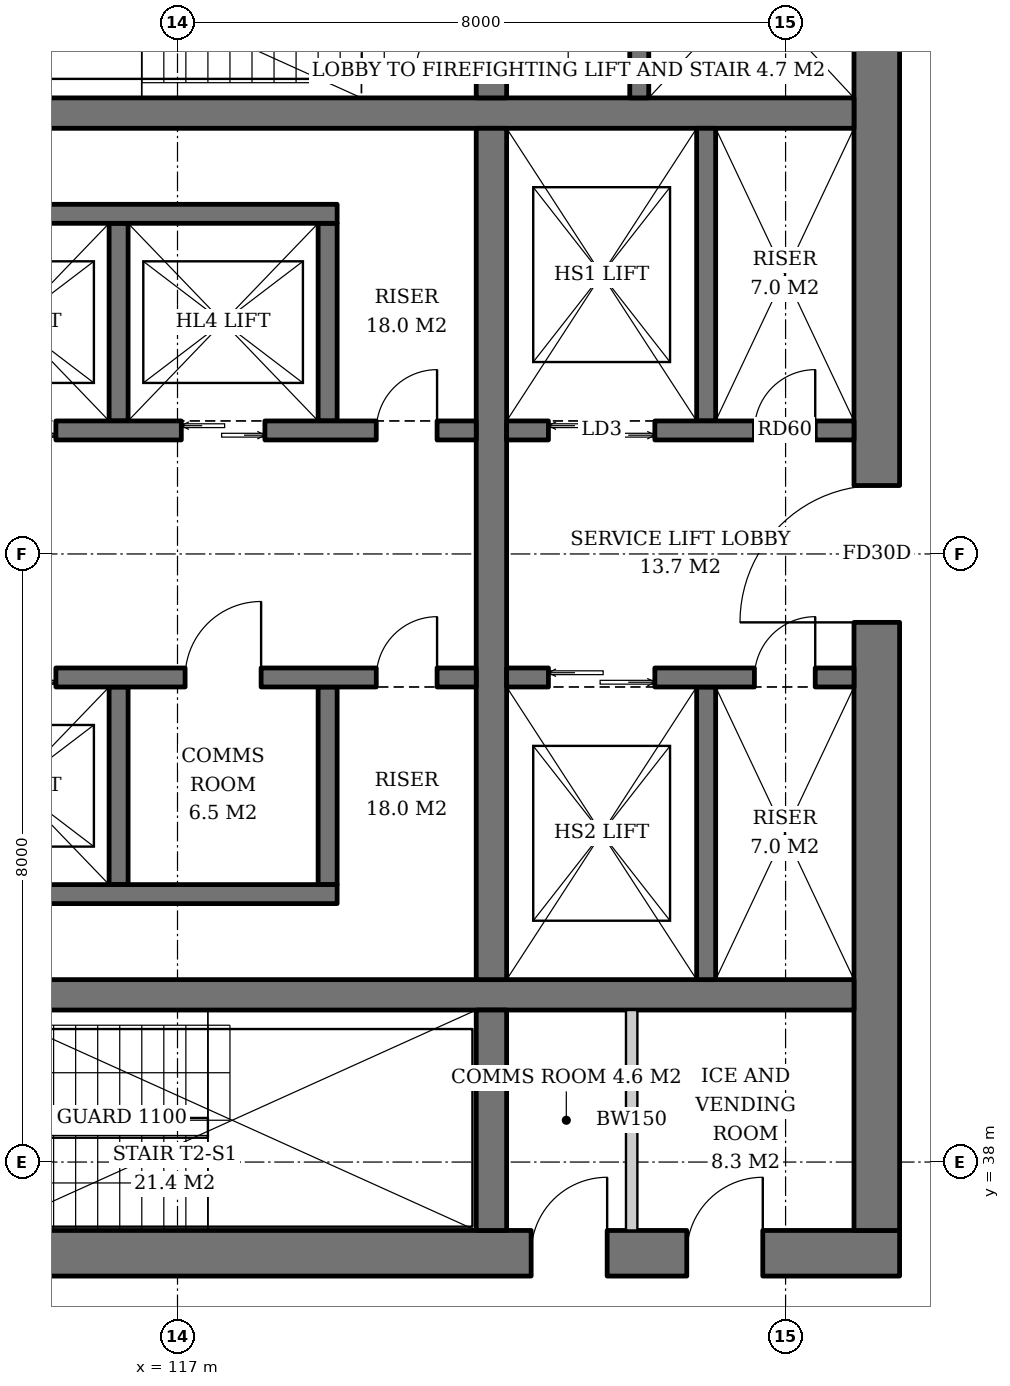
"""IFC4 building model, lengths in metres.
Left out: names, types, materials, properties, quantities, classifications, styles, units other than length and angle.
Written with IfcOpenShell. Run it as: python <this file> out.ifc"""

import sys

from ifc_helpers import new_model, si_unit, direction, frame, frame_2d, origin, place, context, subcontext, project, spatial, rectangle, extrude, element, fill, save


model = new_model("IFC4")
c1 = context("Model", 3, precision=1e-05, world=origin(), true_north=direction((0.0, 1.0)))
c2 = subcontext(c1, "Body", "Model", "MODEL_VIEW")
j1 = project(units=[si_unit("LENGTHUNIT", "METRE"), si_unit("PLANEANGLEUNIT", "RADIAN")], contexts=[c1])
p1 = place(None, origin())
s1 = spatial("IfcSite", under=j1, at=p1, CompositionType="ELEMENT")
p2 = place(p1, origin())
s2 = spatial("IfcBuilding", under=s1, at=p2, CompositionType="ELEMENT")
p3 = place(p2, frame((0.0, 0.0, 97.0)))
s3 = spatial("IfcBuildingStorey", under=s2, at=p3, CompositionType="ELEMENT", Elevation=97.0)
p4 = place(p3, frame((107.5, 36.8, 0.0), z_axis=(0.0, 0.0, 1.0), x_axis=(1.0, 0.0, 0.0)))
e1 = element("IfcWall", 1, at=p4, inside=s3, PredefinedType="SHEAR", context=c2, shape_type="SweptSolid", body=[
    extrude(rectangle(XDim=19.0, YDim=0.6, at=frame_2d((9.5, 0.0))), origin(), (0.0, 0.0, 1.0), 3.8),
])
p5 = place(p4, frame((3.9, 0.0, 0.0)))
e2 = element("IfcOpeningElement", 2, at=p5, cuts=e1, PredefinedType="OPENING", context=c2, shape_type="SweptSolid", body=[
    extrude(rectangle(XDim=1.0, YDim=2.1, at=frame_2d((0.5, 1.05))), frame((0.0, 0.31, 0.0), z_axis=(0.0, -1.0, 0.0), x_axis=(1.0, 0.0, 0.0)), (0.0, 0.0, 1.0), 0.62),
])
p6 = place(p4, frame((14.153, 0.0, 0.0)))
e3 = element("IfcOpeningElement", 3, at=p6, cuts=e1, PredefinedType="OPENING", context=c2, shape_type="SweptSolid", body=[
    extrude(rectangle(XDim=1.0, YDim=2.1, at=frame_2d((0.5, 1.05))), frame((0.0, 0.31, 0.0), z_axis=(0.0, -1.0, 0.0), x_axis=(1.0, 0.0, 0.0)), (0.0, 0.0, 1.0), 0.62),
])
p7 = place(p4, frame((16.2, 0.0, 0.0)))
e4 = element("IfcOpeningElement", 4, at=p7, cuts=e1, PredefinedType="OPENING", context=c2, shape_type="SweptSolid", body=[
    extrude(rectangle(XDim=1.0, YDim=2.1, at=frame_2d((0.5, 1.05))), frame((0.0, 0.31, 0.0), z_axis=(0.0, -1.0, 0.0), x_axis=(1.0, 0.0, 0.0)), (0.0, 0.0, 1.0), 0.62),
])
p8 = place(p3, frame((126.2, 37.1, 0.0), z_axis=(0.0, 0.0, 1.0), x_axis=(0.0, 1.0, 0.0)))
e5 = element("IfcWall", 5, at=p8, inside=s3, PredefinedType="SHEAR", context=c2, shape_type="SweptSolid", body=[
    extrude(rectangle(XDim=17.8, YDim=0.6, at=frame_2d((8.9, 0.0))), origin(), (0.0, 0.0, 1.0), 3.8),
])
p9 = place(p8, frame((8.0, 0.0, 0.0)))
e6 = element("IfcOpeningElement", 6, at=p9, cuts=e5, PredefinedType="OPENING", context=c2, shape_type="SweptSolid", body=[
    extrude(rectangle(XDim=1.8, YDim=2.4, at=frame_2d((0.9, 1.2))), frame((0.0, 0.31, 0.0), z_axis=(0.0, -1.0, 0.0), x_axis=(1.0, 0.0, 0.0)), (0.0, 0.0, 1.0), 0.62),
])
for number, where, z_axis, x_axis in (
    (7, (108.1, 40.2, 0.0), (0.0, 0.0, 1.0), (1.0, 0.0, 0.0)),
    (8, (108.1, 51.8, 0.0), (0.0, 0.0, 1.0), (1.0, 0.0, 0.0)),
):
    element("IfcWall", number, at=place(p3, frame(where, z_axis=z_axis, x_axis=x_axis)), inside=s3, PredefinedType="SHEAR", context=c2, shape_type="SweptSolid", body=[
        extrude(rectangle(XDim=17.8, YDim=0.4, at=frame_2d((8.9, 0.0))), origin(), (0.0, 0.0, 1.0), 3.8),
    ])
p10 = place(p3, frame((121.13, 37.1, 0.0), z_axis=(0.0, 0.0, 1.0), x_axis=(0.0, 1.0, 0.0)))
e9 = element("IfcWall", 9, at=p10, inside=s3, PredefinedType="SHEAR", context=c2, shape_type="SweptSolid", body=[
    extrude(rectangle(XDim=2.9, YDim=0.4, at=frame_2d((1.45, 0.0))), origin(), (0.0, 0.0, 1.0), 3.8),
])
p11 = place(p3, frame((121.13, 40.4, 0.0), z_axis=(0.0, 0.0, 1.0), x_axis=(0.0, 1.0, 0.0)))
e10 = element("IfcWall", 10, at=p11, inside=s3, PredefinedType="SHEAR", context=c2, shape_type="SweptSolid", body=[
    extrude(rectangle(XDim=11.2, YDim=0.4, at=frame_2d((5.6, 0.0))), origin(), (0.0, 0.0, 1.0), 3.8),
])
p12 = place(p3, frame((121.13, 52.0, 0.0), z_axis=(0.0, 0.0, 1.0), x_axis=(0.0, 1.0, 0.0)))
e11 = element("IfcWall", 11, at=p12, inside=s3, PredefinedType="SHEAR", context=c2, shape_type="SweptSolid", body=[
    extrude(rectangle(XDim=2.9, YDim=0.4, at=frame_2d((1.45, 0.0))), origin(), (0.0, 0.0, 1.0), 3.8),
])
p13 = place(p12, frame((0.3, 0.0, 0.0)))
e12 = element("IfcOpeningElement", 12, at=p13, cuts=e11, PredefinedType="OPENING", context=c2, shape_type="SweptSolid", body=[
    extrude(rectangle(XDim=1.0, YDim=2.1, at=frame_2d((0.5, 1.05))), frame((0.0, 0.21, 0.0), z_axis=(0.0, -1.0, 0.0), x_axis=(1.0, 0.0, 0.0)), (0.0, 0.0, 1.0), 0.42),
])
p14 = place(p3, frame((123.075, 52.0, 0.0), z_axis=(0.0, 0.0, 1.0), x_axis=(0.0, 1.0, 0.0)))
e13 = element("IfcWall", 13, at=p14, inside=s3, PredefinedType="SHEAR", context=c2, shape_type="SweptSolid", body=[
    extrude(rectangle(XDim=2.9, YDim=0.25, at=frame_2d((1.45, 0.0))), origin(), (0.0, 0.0, 1.0), 3.8),
])
p15 = place(p14, frame((0.8, 0.0, 0.0)))
e14 = element("IfcOpeningElement", 14, at=p15, cuts=e13, PredefinedType="OPENING", context=c2, shape_type="SweptSolid", body=[
    extrude(rectangle(XDim=1.3, YDim=2.2, at=frame_2d((0.65, 1.1))), frame((0.0, 0.135, 0.0), z_axis=(0.0, -1.0, 0.0), x_axis=(1.0, 0.0, 0.0)), (0.0, 0.0, 1.0), 0.27),
])
for number, where, z_axis, x_axis in (
    (15, (116.225, 47.75, 0.0), (0.0, 0.0, 1.0), (0.0, 1.0, 0.0)),
    (16, (118.975, 47.75, 0.0), (0.0, 0.0, 1.0), (0.0, 1.0, 0.0)),
):
    element("IfcWall", number, at=place(p3, frame(where, z_axis=z_axis, x_axis=x_axis)), inside=s3, PredefinedType="SHEAR", context=c2, shape_type="SweptSolid", body=[
        extrude(rectangle(XDim=2.6, YDim=0.25, at=frame_2d((1.3, 0.0))), origin(), (0.0, 0.0, 1.0), 3.8),
    ])
p16 = place(p3, frame((108.1, 50.475, 0.0), z_axis=(0.0, 0.0, 1.0), x_axis=(1.0, 0.0, 0.0)))
e17 = element("IfcWall", 17, at=p16, inside=s3, PredefinedType="SHEAR", context=c2, shape_type="SweptSolid", body=[
    extrude(rectangle(XDim=11.0, YDim=0.25, at=frame_2d((5.5, 0.0))), origin(), (0.0, 0.0, 1.0), 3.8),
])
p17 = place(p3, frame((108.1, 47.625, 0.0), z_axis=(0.0, 0.0, 1.0), x_axis=(1.0, 0.0, 0.0)))
e18 = element("IfcWall", 18, at=p17, inside=s3, PredefinedType="SHEAR", context=c2, shape_type="SweptSolid", body=[
    extrude(rectangle(XDim=12.83, YDim=0.25, at=frame_2d((6.415, 0.0))), origin(), (0.0, 0.0, 1.0), 3.8),
])
p18 = place(p17, frame((0.7, 0.0, 0.0)))
e19 = element("IfcOpeningElement", 19, at=p18, cuts=e18, PredefinedType="OPENING", context=c2, shape_type="SweptSolid", body=[
    extrude(rectangle(XDim=1.1, YDim=2.2, at=frame_2d((0.55, 1.1))), frame((0.0, 0.135, 0.0), z_axis=(0.0, -1.0, 0.0), x_axis=(1.0, 0.0, 0.0)), (0.0, 0.0, 1.0), 0.27),
])
p19 = place(p17, frame((3.45, 0.0, 0.0)))
e20 = element("IfcOpeningElement", 20, at=p19, cuts=e18, PredefinedType="OPENING", context=c2, shape_type="SweptSolid", body=[
    extrude(rectangle(XDim=1.1, YDim=2.2, at=frame_2d((0.55, 1.1))), frame((0.0, 0.135, 0.0), z_axis=(0.0, -1.0, 0.0), x_axis=(1.0, 0.0, 0.0)), (0.0, 0.0, 1.0), 0.27),
])
p20 = place(p17, frame((6.2, 0.0, 0.0)))
e21 = element("IfcOpeningElement", 21, at=p20, cuts=e18, PredefinedType="OPENING", context=c2, shape_type="SweptSolid", body=[
    extrude(rectangle(XDim=1.1, YDim=2.2, at=frame_2d((0.55, 1.1))), frame((0.0, 0.135, 0.0), z_axis=(0.0, -1.0, 0.0), x_axis=(1.0, 0.0, 0.0)), (0.0, 0.0, 1.0), 0.27),
])
p21 = place(p17, frame((8.95, 0.0, 0.0)))
e22 = element("IfcOpeningElement", 22, at=p21, cuts=e18, PredefinedType="OPENING", context=c2, shape_type="SweptSolid", body=[
    extrude(rectangle(XDim=1.1, YDim=2.2, at=frame_2d((0.55, 1.1))), frame((0.0, 0.135, 0.0), z_axis=(0.0, -1.0, 0.0), x_axis=(1.0, 0.0, 0.0)), (0.0, 0.0, 1.0), 0.27),
])
p22 = place(p17, frame((11.515, 0.0, 0.0)))
e23 = element("IfcOpeningElement", 23, at=p22, cuts=e18, PredefinedType="OPENING", context=c2, shape_type="SweptSolid", body=[
    extrude(rectangle(XDim=0.8, YDim=2.0, at=frame_2d((0.4, 1.0))), frame((0.0, 0.135, 0.0), z_axis=(0.0, -1.0, 0.0), x_axis=(1.0, 0.0, 0.0)), (0.0, 0.0, 1.0), 0.27),
])
for number, where, z_axis, x_axis in (
    (24, (116.225, 44.25, 0.0), (0.0, 0.0, 1.0), (0.0, -1.0, 0.0)),
    (25, (118.975, 44.25, 0.0), (0.0, 0.0, 1.0), (0.0, -1.0, 0.0)),
):
    element("IfcWall", number, at=place(p3, frame(where, z_axis=z_axis, x_axis=x_axis)), inside=s3, PredefinedType="SHEAR", context=c2, shape_type="SweptSolid", body=[
        extrude(rectangle(XDim=2.6, YDim=0.25, at=frame_2d((1.3, 0.0))), origin(), (0.0, 0.0, 1.0), 3.8),
    ])
p23 = place(p3, frame((108.1, 41.525, 0.0), z_axis=(0.0, 0.0, 1.0), x_axis=(1.0, 0.0, 0.0)))
e26 = element("IfcWall", 26, at=p23, inside=s3, PredefinedType="SHEAR", context=c2, shape_type="SweptSolid", body=[
    extrude(rectangle(XDim=11.0, YDim=0.25, at=frame_2d((5.5, 0.0))), origin(), (0.0, 0.0, 1.0), 3.8),
])
p24 = place(p3, frame((108.1, 44.375, 0.0), z_axis=(0.0, 0.0, 1.0), x_axis=(1.0, 0.0, 0.0)))
e27 = element("IfcWall", 27, at=p24, inside=s3, PredefinedType="SHEAR", context=c2, shape_type="SweptSolid", body=[
    extrude(rectangle(XDim=12.83, YDim=0.25, at=frame_2d((6.415, 0.0))), origin(), (0.0, 0.0, 1.0), 3.8),
])
p25 = place(p24, frame((0.7, 0.0, 0.0)))
e28 = element("IfcOpeningElement", 28, at=p25, cuts=e27, PredefinedType="OPENING", context=c2, shape_type="SweptSolid", body=[
    extrude(rectangle(XDim=1.1, YDim=2.2, at=frame_2d((0.55, 1.1))), frame((0.0, 0.135, 0.0), z_axis=(0.0, -1.0, 0.0), x_axis=(1.0, 0.0, 0.0)), (0.0, 0.0, 1.0), 0.27),
])
p26 = place(p24, frame((3.45, 0.0, 0.0)))
e29 = element("IfcOpeningElement", 29, at=p26, cuts=e27, PredefinedType="OPENING", context=c2, shape_type="SweptSolid", body=[
    extrude(rectangle(XDim=1.1, YDim=2.2, at=frame_2d((0.55, 1.1))), frame((0.0, 0.135, 0.0), z_axis=(0.0, -1.0, 0.0), x_axis=(1.0, 0.0, 0.0)), (0.0, 0.0, 1.0), 0.27),
])
p27 = place(p24, frame((6.2, 0.0, 0.0)))
e30 = element("IfcOpeningElement", 30, at=p27, cuts=e27, PredefinedType="OPENING", context=c2, shape_type="SweptSolid", body=[
    extrude(rectangle(XDim=1.1, YDim=2.2, at=frame_2d((0.55, 1.1))), frame((0.0, 0.135, 0.0), z_axis=(0.0, -1.0, 0.0), x_axis=(1.0, 0.0, 0.0)), (0.0, 0.0, 1.0), 0.27),
])
p28 = place(p24, frame((9.0, 0.0, 0.0)))
e31 = element("IfcOpeningElement", 31, at=p28, cuts=e27, PredefinedType="OPENING", context=c2, shape_type="SweptSolid", body=[
    extrude(rectangle(XDim=1.0, YDim=2.1, at=frame_2d((0.5, 1.05))), frame((0.0, 0.135, 0.0), z_axis=(0.0, -1.0, 0.0), x_axis=(1.0, 0.0, 0.0)), (0.0, 0.0, 1.0), 0.27),
])
p29 = place(p24, frame((11.515, 0.0, 0.0)))
e32 = element("IfcOpeningElement", 32, at=p29, cuts=e27, PredefinedType="OPENING", context=c2, shape_type="SweptSolid", body=[
    extrude(rectangle(XDim=0.8, YDim=2.0, at=frame_2d((0.4, 1.0))), frame((0.0, 0.135, 0.0), z_axis=(0.0, -1.0, 0.0), x_axis=(1.0, 0.0, 0.0)), (0.0, 0.0, 1.0), 0.27),
])
p30 = place(p3, frame((123.955, 47.75, 0.0), z_axis=(0.0, 0.0, 1.0), x_axis=(0.0, 1.0, 0.0)))
e33 = element("IfcWall", 33, at=p30, inside=s3, PredefinedType="SHEAR", context=c2, shape_type="SweptSolid", body=[
    extrude(rectangle(XDim=3.85, YDim=0.25, at=frame_2d((1.925, 0.0))), origin(), (0.0, 0.0, 1.0), 3.8),
])
p31 = place(p3, frame((121.33, 47.625, 0.0), z_axis=(0.0, 0.0, 1.0), x_axis=(1.0, 0.0, 0.0)))
e34 = element("IfcWall", 34, at=p31, inside=s3, PredefinedType="SHEAR", context=c2, shape_type="SweptSolid", body=[
    extrude(rectangle(XDim=4.57, YDim=0.25, at=frame_2d((2.285, 0.0))), origin(), (0.0, 0.0, 1.0), 3.8),
])
p32 = place(p31, frame((0.55, 0.0, 0.0)))
e35 = element("IfcOpeningElement", 35, at=p32, cuts=e34, PredefinedType="OPENING", context=c2, shape_type="SweptSolid", body=[
    extrude(rectangle(XDim=1.4, YDim=2.4, at=frame_2d((0.7, 1.2))), frame((0.0, 0.135, 0.0), z_axis=(0.0, -1.0, 0.0), x_axis=(1.0, 0.0, 0.0)), (0.0, 0.0, 1.0), 0.27),
])
p33 = place(p31, frame((3.26, 0.0, 0.0)))
e36 = element("IfcOpeningElement", 36, at=p33, cuts=e34, PredefinedType="OPENING", context=c2, shape_type="SweptSolid", body=[
    extrude(rectangle(XDim=0.8, YDim=2.0, at=frame_2d((0.4, 1.0))), frame((0.0, 0.135, 0.0), z_axis=(0.0, -1.0, 0.0), x_axis=(1.0, 0.0, 0.0)), (0.0, 0.0, 1.0), 0.27),
])
p34 = place(p3, frame((123.955, 44.25, 0.0), z_axis=(0.0, 0.0, 1.0), x_axis=(0.0, -1.0, 0.0)))
e37 = element("IfcWall", 37, at=p34, inside=s3, PredefinedType="SHEAR", context=c2, shape_type="SweptSolid", body=[
    extrude(rectangle(XDim=3.85, YDim=0.25, at=frame_2d((1.925, 0.0))), origin(), (0.0, 0.0, 1.0), 3.8),
])
p35 = place(p3, frame((121.33, 44.375, 0.0), z_axis=(0.0, 0.0, 1.0), x_axis=(1.0, 0.0, 0.0)))
e38 = element("IfcWall", 38, at=p35, inside=s3, PredefinedType="SHEAR", context=c2, shape_type="SweptSolid", body=[
    extrude(rectangle(XDim=4.57, YDim=0.25, at=frame_2d((2.285, 0.0))), origin(), (0.0, 0.0, 1.0), 3.8),
])
p36 = place(p35, frame((0.55, 0.0, 0.0)))
e39 = element("IfcOpeningElement", 39, at=p36, cuts=e38, PredefinedType="OPENING", context=c2, shape_type="SweptSolid", body=[
    extrude(rectangle(XDim=1.4, YDim=2.4, at=frame_2d((0.7, 1.2))), frame((0.0, 0.135, 0.0), z_axis=(0.0, -1.0, 0.0), x_axis=(1.0, 0.0, 0.0)), (0.0, 0.0, 1.0), 0.27),
])
p37 = place(p35, frame((3.26, 0.0, 0.0)))
e40 = element("IfcOpeningElement", 40, at=p37, cuts=e38, PredefinedType="OPENING", context=c2, shape_type="SweptSolid", body=[
    extrude(rectangle(XDim=0.8, YDim=2.0, at=frame_2d((0.4, 1.0))), frame((0.0, 0.135, 0.0), z_axis=(0.0, -1.0, 0.0), x_axis=(1.0, 0.0, 0.0)), (0.0, 0.0, 1.0), 0.27),
])
p38 = place(p3, frame((122.975, 37.1, 0.0), z_axis=(0.0, 0.0, 1.0), x_axis=(0.0, 1.0, 0.0)))
e41 = element("IfcWall", 41, at=p38, inside=s3, PredefinedType="SOLIDWALL", context=c2, shape_type="SweptSolid", body=[
    extrude(rectangle(XDim=2.9, YDim=0.15, at=frame_2d((1.45, 0.0))), origin(), (0.0, 0.0, 1.0), 3.6),
])
p39 = place(p20, origin())
e42 = element("IfcDoor", 42, at=p39, inside=s3, OperationType="DOUBLE_DOOR_SLIDING", PredefinedType="DOOR", context=c2, shape_type="SweptSolid", body=[
    extrude(rectangle(XDim=1.1, YDim=2.2, at=frame_2d((0.55, 1.1))), frame((0.0, 0.025, 0.0), z_axis=(0.0, -1.0, 0.0), x_axis=(1.0, 0.0, 0.0)), (0.0, 0.0, 1.0), 0.05),
])
fill(e21, e42)
p40 = place(p21, origin())
e43 = element("IfcDoor", 43, at=p40, inside=s3, OperationType="DOUBLE_DOOR_SLIDING", PredefinedType="DOOR", context=c2, shape_type="SweptSolid", body=[
    extrude(rectangle(XDim=1.1, YDim=2.2, at=frame_2d((0.55, 1.1))), frame((0.0, 0.025, 0.0), z_axis=(0.0, -1.0, 0.0), x_axis=(1.0, 0.0, 0.0)), (0.0, 0.0, 1.0), 0.05),
])
fill(e22, e43)
p41 = place(p22, origin())
e44 = element("IfcDoor", 44, at=p41, inside=s3, OperationType="SINGLE_SWING_RIGHT", PredefinedType="DOOR", context=c2, shape_type="SweptSolid", body=[
    extrude(rectangle(XDim=0.8, YDim=2.0, at=frame_2d((0.4, 1.0))), frame((0.0, 0.025, 0.0), z_axis=(0.0, -1.0, 0.0), x_axis=(1.0, 0.0, 0.0)), (0.0, 0.0, 1.0), 0.05),
])
fill(e23, e44)
p42 = place(p27, origin())
e45 = element("IfcDoor", 45, at=p42, inside=s3, OperationType="DOUBLE_DOOR_SLIDING", PredefinedType="DOOR", context=c2, shape_type="SweptSolid", body=[
    extrude(rectangle(XDim=1.1, YDim=2.2, at=frame_2d((0.55, 1.1))), frame((0.0, 0.025, 0.0), z_axis=(0.0, -1.0, 0.0), x_axis=(1.0, 0.0, 0.0)), (0.0, 0.0, 1.0), 0.05),
])
fill(e30, e45)
p43 = place(p28, origin())
e46 = element("IfcDoor", 46, at=p43, inside=s3, OperationType="SINGLE_SWING_RIGHT", PredefinedType="DOOR", context=c2, shape_type="SweptSolid", body=[
    extrude(rectangle(XDim=1.0, YDim=2.1, at=frame_2d((0.5, 1.05))), frame((0.0, 0.025, 0.0), z_axis=(0.0, -1.0, 0.0), x_axis=(1.0, 0.0, 0.0)), (0.0, 0.0, 1.0), 0.05),
])
fill(e31, e46)
p44 = place(p29, origin())
e47 = element("IfcDoor", 47, at=p44, inside=s3, OperationType="SINGLE_SWING_RIGHT", PredefinedType="DOOR", context=c2, shape_type="SweptSolid", body=[
    extrude(rectangle(XDim=0.8, YDim=2.0, at=frame_2d((0.4, 1.0))), frame((0.0, 0.025, 0.0), z_axis=(0.0, -1.0, 0.0), x_axis=(1.0, 0.0, 0.0)), (0.0, 0.0, 1.0), 0.05),
])
fill(e32, e47)
p45 = place(p32, origin())
e48 = element("IfcDoor", 48, at=p45, inside=s3, OperationType="DOUBLE_DOOR_SLIDING", PredefinedType="DOOR", context=c2, shape_type="SweptSolid", body=[
    extrude(rectangle(XDim=1.4, YDim=2.4, at=frame_2d((0.7, 1.2))), frame((0.0, 0.025, 0.0), z_axis=(0.0, -1.0, 0.0), x_axis=(1.0, 0.0, 0.0)), (0.0, 0.0, 1.0), 0.05),
])
fill(e35, e48)
p46 = place(p33, origin())
e49 = element("IfcDoor", 49, at=p46, inside=s3, OperationType="SINGLE_SWING_RIGHT", PredefinedType="DOOR", context=c2, shape_type="SweptSolid", body=[
    extrude(rectangle(XDim=0.8, YDim=2.0, at=frame_2d((0.4, 1.0))), frame((0.0, 0.025, 0.0), z_axis=(0.0, -1.0, 0.0), x_axis=(1.0, 0.0, 0.0)), (0.0, 0.0, 1.0), 0.05),
])
fill(e36, e49)
p47 = place(p36, origin())
e50 = element("IfcDoor", 50, at=p47, inside=s3, OperationType="DOUBLE_DOOR_SLIDING", PredefinedType="DOOR", context=c2, shape_type="SweptSolid", body=[
    extrude(rectangle(XDim=1.4, YDim=2.4, at=frame_2d((0.7, 1.2))), frame((0.0, 0.025, 0.0), z_axis=(0.0, -1.0, 0.0), x_axis=(1.0, 0.0, 0.0)), (0.0, 0.0, 1.0), 0.05),
])
fill(e39, e50)
p48 = place(p37, origin())
e51 = element("IfcDoor", 51, at=p48, inside=s3, OperationType="SINGLE_SWING_RIGHT", PredefinedType="DOOR", context=c2, shape_type="SweptSolid", body=[
    extrude(rectangle(XDim=0.8, YDim=2.0, at=frame_2d((0.4, 1.0))), frame((0.0, 0.025, 0.0), z_axis=(0.0, -1.0, 0.0), x_axis=(1.0, 0.0, 0.0)), (0.0, 0.0, 1.0), 0.05),
])
fill(e40, e51)
p49 = place(p13, origin())
e52 = element("IfcDoor", 52, at=p49, inside=s3, OperationType="SINGLE_SWING_LEFT", PredefinedType="DOOR", context=c2, shape_type="SweptSolid", body=[
    extrude(rectangle(XDim=1.0, YDim=2.1, at=frame_2d((0.5, 1.05))), frame((0.0, 0.025, 0.0), z_axis=(0.0, -1.0, 0.0), x_axis=(1.0, 0.0, 0.0)), (0.0, 0.0, 1.0), 0.05),
])
fill(e12, e52)
p50 = place(p9, origin())
e53 = element("IfcDoor", 53, at=p50, inside=s3, OperationType="DOUBLE_DOOR_SINGLE_SWING", PredefinedType="DOOR", context=c2, shape_type="SweptSolid", body=[
    extrude(rectangle(XDim=1.8, YDim=2.4, at=frame_2d((0.9, 1.2))), frame((0.0, 0.025, 0.0), z_axis=(0.0, -1.0, 0.0), x_axis=(1.0, 0.0, 0.0)), (0.0, 0.0, 1.0), 0.05),
])
fill(e6, e53)
p51 = place(p6, origin())
e54 = element("IfcDoor", 54, at=p51, inside=s3, OperationType="SINGLE_SWING_RIGHT", PredefinedType="DOOR", context=c2, shape_type="SweptSolid", body=[
    extrude(rectangle(XDim=1.0, YDim=2.1, at=frame_2d((0.5, 1.05))), frame((0.0, 0.29, 0.0), z_axis=(0.0, -1.0, 0.0), x_axis=(1.0, 0.0, 0.0)), (0.0, 0.0, 1.0), 0.05),
])
fill(e3, e54)
p52 = place(p7, origin())
e55 = element("IfcDoor", 55, at=p52, inside=s3, OperationType="SINGLE_SWING_RIGHT", PredefinedType="DOOR", context=c2, shape_type="SweptSolid", body=[
    extrude(rectangle(XDim=1.0, YDim=2.1, at=frame_2d((0.5, 1.05))), frame((0.0, 0.29, 0.0), z_axis=(0.0, -1.0, 0.0), x_axis=(1.0, 0.0, 0.0)), (0.0, 0.0, 1.0), 0.05),
])
fill(e4, e55)
save(model, sys.argv[1])
